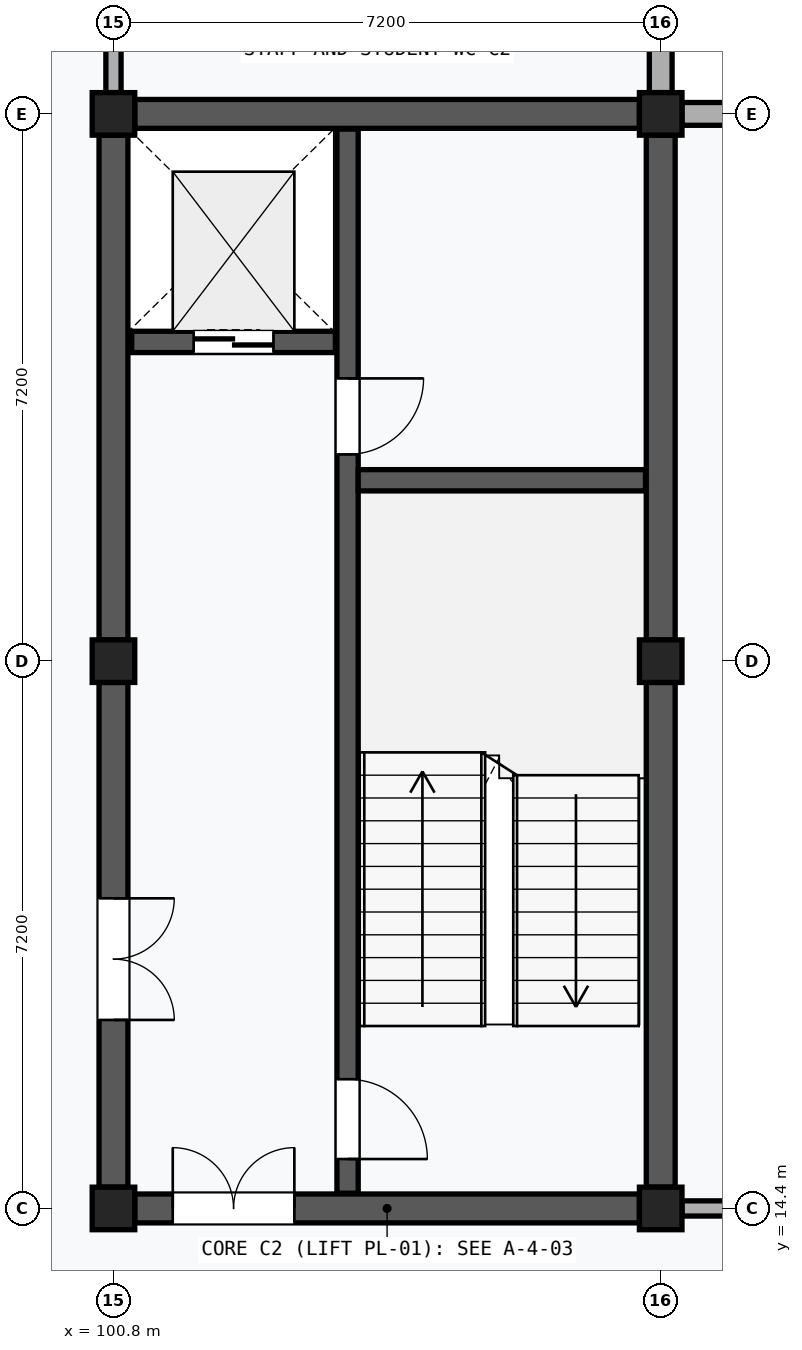
"""IFC4 building model, lengths in metres.
Left out: names, types, materials, properties, quantities, classifications, styles, units other than length and angle.
Written with IfcOpenShell. Run it as: python <this file> out.ifc"""

import sys

from ifc_helpers import new_model, si_unit, direction, frame, frame_2d, origin, origin_2d, place, context, subcontext, project, spatial, rectangle, extrude, element, fill, save


model = new_model("IFC4")
c1 = context("Model", 3, precision=1e-05, world=origin(), true_north=direction((0.0, 1.0)))
c2 = subcontext(c1, "Body", "Model", "MODEL_VIEW")
j1 = project(units=[si_unit("LENGTHUNIT", "METRE"), si_unit("PLANEANGLEUNIT", "RADIAN")], contexts=[c1])
p1 = place(None, origin())
s1 = spatial("IfcSite", under=j1, at=p1, CompositionType="ELEMENT")
p2 = place(p1, origin())
s2 = spatial("IfcBuilding", under=s1, at=p2, CompositionType="ELEMENT")
p3 = place(p2, frame((0.0, 0.0, 38.8)))
s3 = spatial("IfcBuildingStorey", under=s2, at=p3, CompositionType="ELEMENT", Elevation=38.8)
for number, where, z_axis, x_axis in (
    (1, (100.8, 14.4, 0.0), (0.0, 0.0, 1.0), (1.0, 0.0, 0.0)),
    (2, (100.8, 21.6, 0.0), (0.0, 0.0, 1.0), (1.0, 0.0, 0.0)),
    (3, (100.8, 28.8, 0.0), (0.0, 0.0, 1.0), (1.0, 0.0, 0.0)),
    (4, (108.0, 14.4, 0.0), (0.0, 0.0, 1.0), (1.0, 0.0, 0.0)),
    (5, (108.0, 21.6, 0.0), (0.0, 0.0, 1.0), (1.0, 0.0, 0.0)),
    (6, (108.0, 28.8, 0.0), (0.0, 0.0, 1.0), (1.0, 0.0, 0.0)),
):
    element("IfcColumn", number, at=place(p3, frame(where, z_axis=z_axis, x_axis=x_axis)), inside=s3, PredefinedType="COLUMN", context=c2, shape_type="SweptSolid", body=[
        extrude(rectangle(XDim=0.56, YDim=0.56, at=origin_2d()), origin(), (0.0, 0.0, 1.0), 4.0),
    ])
p4 = place(p3, frame((108.0, 29.08, 0.0), z_axis=(0.0, 0.0, 1.0), x_axis=(0.0, 1.0, 0.0)))
e7 = element("IfcWall", 7, at=p4, inside=s3, PredefinedType="SOLIDWALL", context=c2, shape_type="SweptSolid", body=[
    extrude(rectangle(XDim=6.66, YDim=0.3, at=frame_2d((3.33, 0.0))), origin(), (0.0, 0.0, 1.0), 3.17),
])
p5 = place(p3, frame((108.28, 28.8, 0.0), z_axis=(0.0, 0.0, 1.0), x_axis=(1.0, 0.0, 0.0)))
e8 = element("IfcWall", 8, at=p5, inside=s3, PredefinedType="SOLIDWALL", context=c2, shape_type="SweptSolid", body=[
    extrude(rectangle(XDim=6.74, YDim=0.3, at=frame_2d((3.37, 0.0))), origin(), (0.0, 0.0, 1.0), 3.17),
])
p6 = place(p5, frame((2.62, 0.0, 1.1)))
e9 = element("IfcOpeningElement", 9, at=p6, cuts=e8, PredefinedType="OPENING", context=c2, shape_type="SweptSolid", body=[
    extrude(rectangle(XDim=1.5, YDim=1.35, at=frame_2d((0.75, 0.675))), frame((0.0, 0.162, 0.0), z_axis=(0.0, -1.0, 0.0), x_axis=(1.0, 0.0, 0.0)), (0.0, 0.0, 1.0), 0.324),
])
p7 = place(p3, frame((100.8, 14.68, 0.0), z_axis=(0.0, 0.0, 1.0), x_axis=(0.0, 1.0, 0.0)))
e10 = element("IfcWall", 10, at=p7, inside=s3, PredefinedType="SHEAR", context=c2, shape_type="SweptSolid", body=[
    extrude(rectangle(XDim=6.64, YDim=0.38, at=frame_2d((3.32, 0.0))), origin(), (0.0, 0.0, 1.0), 3.01),
])
p8 = place(p7, frame((2.2, 0.0, 0.0)))
e11 = element("IfcOpeningElement", 11, at=p8, cuts=e10, PredefinedType="OPENING", context=c2, shape_type="SweptSolid", body=[
    extrude(rectangle(XDim=1.6, YDim=2.2, at=frame_2d((0.8, 1.1))), frame((0.0, 0.202, 0.0), z_axis=(0.0, -1.0, 0.0), x_axis=(1.0, 0.0, 0.0)), (0.0, 0.0, 1.0), 0.404),
])
for number, where, z_axis, x_axis in (
    (12, (100.8, 21.88, 0.0), (0.0, 0.0, 1.0), (0.0, 1.0, 0.0)),
    (13, (108.0, 14.68, 0.0), (0.0, 0.0, 1.0), (0.0, 1.0, 0.0)),
    (14, (108.0, 21.88, 0.0), (0.0, 0.0, 1.0), (0.0, 1.0, 0.0)),
):
    element("IfcWall", number, at=place(p3, frame(where, z_axis=z_axis, x_axis=x_axis)), inside=s3, PredefinedType="SHEAR", context=c2, shape_type="SweptSolid", body=[
        extrude(rectangle(XDim=6.64, YDim=0.38, at=frame_2d((3.32, 0.0))), origin(), (0.0, 0.0, 1.0), 3.01),
    ])
p9 = place(p3, frame((101.08, 14.4, 0.0), z_axis=(0.0, 0.0, 1.0), x_axis=(1.0, 0.0, 0.0)))
e15 = element("IfcWall", 15, at=p9, inside=s3, PredefinedType="SHEAR", context=c2, shape_type="SweptSolid", body=[
    extrude(rectangle(XDim=6.64, YDim=0.38, at=frame_2d((3.32, 0.0))), origin(), (0.0, 0.0, 1.0), 3.01),
])
p10 = place(p9, frame((0.5, 0.0, 0.0)))
e16 = element("IfcOpeningElement", 16, at=p10, cuts=e15, PredefinedType="OPENING", context=c2, shape_type="SweptSolid", body=[
    extrude(rectangle(XDim=1.6, YDim=2.2, at=frame_2d((0.8, 1.1))), frame((0.0, 0.202, 0.0), z_axis=(0.0, -1.0, 0.0), x_axis=(1.0, 0.0, 0.0)), (0.0, 0.0, 1.0), 0.404),
])
p11 = place(p3, frame((101.08, 28.8, 0.0), z_axis=(0.0, 0.0, 1.0), x_axis=(1.0, 0.0, 0.0)))
e17 = element("IfcWall", 17, at=p11, inside=s3, PredefinedType="SHEAR", context=c2, shape_type="SweptSolid", body=[
    extrude(rectangle(XDim=6.64, YDim=0.38, at=frame_2d((3.32, 0.0))), origin(), (0.0, 0.0, 1.0), 3.01),
])
p12 = place(p3, frame((103.88, 14.6, 0.0), z_axis=(0.0, 0.0, 1.0), x_axis=(0.0, 1.0, 0.0)))
e18 = element("IfcWall", 18, at=p12, inside=s3, PredefinedType="SHEAR", context=c2, shape_type="SweptSolid", body=[
    extrude(rectangle(XDim=14.0, YDim=0.28, at=frame_2d((7.0, 0.0))), origin(), (0.0, 0.0, 1.0), 3.74),
])
p13 = place(p12, frame((0.45, 0.0, 0.0)))
e19 = element("IfcOpeningElement", 19, at=p13, cuts=e18, PredefinedType="OPENING", context=c2, shape_type="SweptSolid", body=[
    extrude(rectangle(XDim=1.05, YDim=2.15, at=frame_2d((0.525, 1.075))), frame((0.0, 0.152, 0.0), z_axis=(0.0, -1.0, 0.0), x_axis=(1.0, 0.0, 0.0)), (0.0, 0.0, 1.0), 0.304),
])
p14 = place(p12, frame((9.72, 0.0, 0.0)))
e20 = element("IfcOpeningElement", 20, at=p14, cuts=e18, PredefinedType="OPENING", context=c2, shape_type="SweptSolid", body=[
    extrude(rectangle(XDim=1.0, YDim=2.15, at=frame_2d((0.5, 1.075))), frame((0.0, 0.152, 0.0), z_axis=(0.0, -1.0, 0.0), x_axis=(1.0, 0.0, 0.0)), (0.0, 0.0, 1.0), 0.304),
])
p15 = place(p3, frame((104.02, 23.98, 0.0), z_axis=(0.0, 0.0, 1.0), x_axis=(1.0, 0.0, 0.0)))
e21 = element("IfcWall", 21, at=p15, inside=s3, PredefinedType="SHEAR", context=c2, shape_type="SweptSolid", body=[
    extrude(rectangle(XDim=3.78, YDim=0.28, at=frame_2d((1.89, 0.0))), origin(), (0.0, 0.0, 1.0), 3.74),
])
p16 = place(p3, frame((101.04, 25.8, 0.0), z_axis=(0.0, 0.0, 1.0), x_axis=(1.0, 0.0, 0.0)))
e22 = element("IfcWall", 22, at=p16, inside=s3, PredefinedType="SHEAR", context=c2, shape_type="SweptSolid", body=[
    extrude(rectangle(XDim=2.68, YDim=0.28, at=frame_2d((1.34, 0.0))), origin(), (0.0, 0.0, 1.0), 3.74),
])
p17 = place(p16, frame((0.815, 0.0, 0.0)))
e23 = element("IfcOpeningElement", 23, at=p17, cuts=e22, PredefinedType="OPENING", context=c2, shape_type="SweptSolid", body=[
    extrude(rectangle(XDim=1.05, YDim=2.2, at=frame_2d((0.525, 1.1))), frame((0.0, 0.152, 0.0), z_axis=(0.0, -1.0, 0.0), x_axis=(1.0, 0.0, 0.0)), (0.0, 0.0, 1.0), 0.304),
])
p18 = place(p3, frame((108.28, 14.4, 0.0), z_axis=(0.0, 0.0, 1.0), x_axis=(1.0, 0.0, 0.0)))
e24 = element("IfcWall", 24, at=p18, inside=s3, PredefinedType="PARTITIONING", context=c2, shape_type="SweptSolid", body=[
    extrude(rectangle(XDim=6.64, YDim=0.2, at=frame_2d((3.32, 0.0))), origin(), (0.0, 0.0, 1.0), 3.01),
])
p19 = place(p18, frame((2.72, 0.0, 0.0)))
e25 = element("IfcOpeningElement", 25, at=p19, cuts=e24, PredefinedType="OPENING", context=c2, shape_type="SweptSolid", body=[
    extrude(rectangle(XDim=1.2, YDim=2.24, at=frame_2d((0.6, 1.12))), frame((0.0, 0.112, 0.0), z_axis=(0.0, -1.0, 0.0), x_axis=(1.0, 0.0, 0.0)), (0.0, 0.0, 1.0), 0.224),
])
p20 = place(p3, frame((100.8, 29.08, 0.0), z_axis=(0.0, 0.0, 1.0), x_axis=(0.0, 1.0, 0.0)))
e26 = element("IfcWall", 26, at=p20, inside=s3, PredefinedType="PARTITIONING", context=c2, shape_type="SweptSolid", body=[
    extrude(rectangle(XDim=6.64, YDim=0.2, at=frame_2d((3.32, 0.0))), origin(), (0.0, 0.0, 1.0), 3.01),
])
p21 = place(p20, frame((2.68, 0.0, 0.0)))
e27 = element("IfcOpeningElement", 27, at=p21, cuts=e26, PredefinedType="OPENING", context=c2, shape_type="SweptSolid", body=[
    extrude(rectangle(XDim=1.28, YDim=2.28, at=frame_2d((0.64, 1.14))), frame((0.0, 0.112, 0.0), z_axis=(0.0, -1.0, 0.0), x_axis=(1.0, 0.0, 0.0)), (0.0, 0.0, 1.0), 0.224),
])
p22 = place(p8, frame((1.6, 0.0, 0.0), z_axis=(0.0, 0.0, 1.0), x_axis=(-1.0, 0.0, 0.0)))
e28 = element("IfcDoor", 28, at=p22, inside=s3, OperationType="DOUBLE_DOOR_SINGLE_SWING", PredefinedType="DOOR", context=c2, shape_type="SweptSolid", body=[
    extrude(rectangle(XDim=1.6, YDim=2.2, at=frame_2d((0.8, 1.1))), frame((0.0, 0.025, 0.0), z_axis=(0.0, -1.0, 0.0), x_axis=(1.0, 0.0, 0.0)), (0.0, 0.0, 1.0), 0.05),
])
fill(e11, e28)
p23 = place(p10, origin())
e29 = element("IfcDoor", 29, at=p23, inside=s3, OperationType="DOUBLE_DOOR_SINGLE_SWING", PredefinedType="DOOR", context=c2, shape_type="SweptSolid", body=[
    extrude(rectangle(XDim=1.6, YDim=2.2, at=frame_2d((0.8, 1.1))), frame((0.0, 0.025, 0.0), z_axis=(0.0, -1.0, 0.0), x_axis=(1.0, 0.0, 0.0)), (0.0, 0.0, 1.0), 0.05),
])
fill(e16, e29)
p24 = place(p13, frame((1.05, 0.0, 0.0), z_axis=(0.0, 0.0, 1.0), x_axis=(-1.0, 0.0, 0.0)))
e30 = element("IfcDoor", 30, at=p24, inside=s3, OperationType="SINGLE_SWING_RIGHT", PredefinedType="DOOR", context=c2, shape_type="SweptSolid", body=[
    extrude(rectangle(XDim=1.05, YDim=2.15, at=frame_2d((0.525, 1.075))), frame((0.0, 0.025, 0.0), z_axis=(0.0, -1.0, 0.0), x_axis=(1.0, 0.0, 0.0)), (0.0, 0.0, 1.0), 0.05),
])
fill(e19, e30)
p25 = place(p14, frame((1.0, 0.0, 0.0), z_axis=(0.0, 0.0, 1.0), x_axis=(-1.0, 0.0, 0.0)))
e31 = element("IfcDoor", 31, at=p25, inside=s3, OperationType="SINGLE_SWING_LEFT", PredefinedType="DOOR", context=c2, shape_type="SweptSolid", body=[
    extrude(rectangle(XDim=1.0, YDim=2.15, at=frame_2d((0.5, 1.075))), frame((0.0, 0.025, 0.0), z_axis=(0.0, -1.0, 0.0), x_axis=(1.0, 0.0, 0.0)), (0.0, 0.0, 1.0), 0.05),
])
fill(e20, e31)
p26 = place(p17, frame((1.05, 0.0, 0.0), z_axis=(0.0, 0.0, 1.0), x_axis=(-1.0, 0.0, 0.0)))
e32 = element("IfcDoor", 32, at=p26, inside=s3, OperationType="DOUBLE_DOOR_SLIDING", PredefinedType="DOOR", context=c2, shape_type="SweptSolid", body=[
    extrude(rectangle(XDim=1.05, YDim=2.2, at=frame_2d((0.525, 1.1))), frame((0.0, 0.025, 0.0), z_axis=(0.0, -1.0, 0.0), x_axis=(1.0, 0.0, 0.0)), (0.0, 0.0, 1.0), 0.05),
])
fill(e23, e32)
save(model, sys.argv[1])
